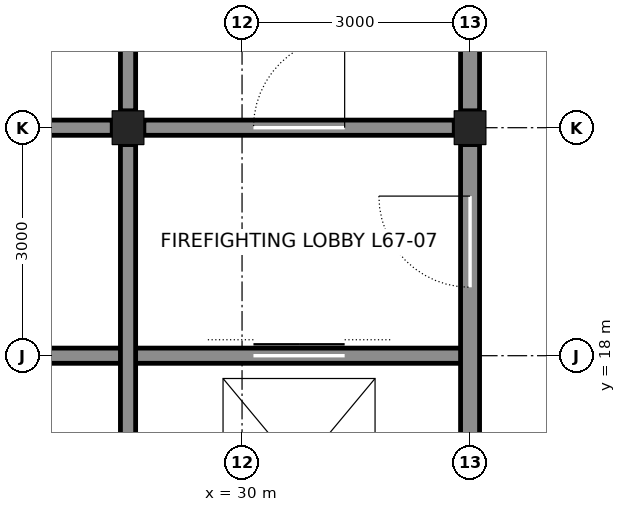
"""IFC4 building model, lengths in metres.
Left out: names, types, materials, properties, quantities, classifications, styles, units other than length and angle.
Written with IfcOpenShell. Run it as: python <this file> out.ifc"""

import sys

from ifc_helpers import new_model, si_unit, direction, frame, frame_2d, origin, origin_2d, place, context, subcontext, project, spatial, rectangle, i_section, extrude, element, fill, save


model = new_model("IFC4")
c1 = context("Model", 3, precision=1e-05, world=origin(), true_north=direction((0.0, 1.0)))
c2 = subcontext(c1, "Body", "Model", "MODEL_VIEW")
j1 = project(units=[si_unit("LENGTHUNIT", "METRE"), si_unit("PLANEANGLEUNIT", "RADIAN")], contexts=[c1])
p1 = place(None, origin())
s1 = spatial("IfcSite", under=j1, at=p1, CompositionType="ELEMENT")
p2 = place(p1, origin())
s2 = spatial("IfcBuilding", under=s1, at=p2, CompositionType="ELEMENT")
p3 = place(p2, frame((0.0, 0.0, 300.0)))
s3 = spatial("IfcBuildingStorey", under=s2, at=p3, CompositionType="ELEMENT", Elevation=300.0)
for number, where, z_axis, x_axis in (
    (1, (33.0, 21.0, 0.0), (0.0, 0.0, 1.0), (1.0, 0.0, 0.0)),
    (2, (28.5, 21.0, 0.0), (0.0, 0.0, 1.0), (1.0, 0.0, 0.0)),
):
    element("IfcColumn", number, at=place(p3, frame(where, z_axis=z_axis, x_axis=x_axis)), inside=s3, PredefinedType="COLUMN", context=c2, shape_type="SweptSolid", body=[
        extrude(i_section(OverallWidth=0.417, OverallDepth=0.445, WebThickness=0.039, FlangeThickness=0.063, at=origin_2d()), origin(), (0.0, 0.0, 1.0), 6.0),
    ])
p4 = place(p3, frame((25.5, 18.0, 0.0), z_axis=(0.0, 0.0, 1.0), x_axis=(1.0, 0.0, 0.0)))
e3 = element("IfcWall", 3, at=p4, inside=s3, PredefinedType="SOLIDWALL", context=c2, shape_type="SweptSolid", body=[
    extrude(rectangle(XDim=7.5, YDim=0.2, at=frame_2d((3.75, 0.0))), origin(), (0.0, 0.0, 1.0), 5.84),
])
p5 = place(p4, frame((4.65, 0.0, 0.0)))
e4 = element("IfcOpeningElement", 4, at=p5, cuts=e3, PredefinedType="OPENING", context=c2, shape_type="SweptSolid", body=[
    extrude(rectangle(XDim=1.2, YDim=2.1, at=frame_2d((0.6, 1.05))), frame((0.0, 0.11, 0.0), z_axis=(0.0, -1.0, 0.0), x_axis=(1.0, 0.0, 0.0)), (0.0, 0.0, 1.0), 0.22),
])
p6 = place(p3, frame((25.5, 21.0, 0.0), z_axis=(0.0, 0.0, 1.0), x_axis=(1.0, 0.0, 0.0)))
e5 = element("IfcWall", 5, at=p6, inside=s3, PredefinedType="SOLIDWALL", context=c2, shape_type="SweptSolid", body=[
    extrude(rectangle(XDim=2.792, YDim=0.2, at=frame_2d((1.396, 0.0))), origin(), (0.0, 0.0, 1.0), 4.89),
])
p7 = place(p3, frame((28.708, 21.0, 0.0), z_axis=(0.0, 0.0, 1.0), x_axis=(1.0, 0.0, 0.0)))
e6 = element("IfcWall", 6, at=p7, inside=s3, PredefinedType="SOLIDWALL", context=c2, shape_type="SweptSolid", body=[
    extrude(rectangle(XDim=4.083, YDim=0.2, at=frame_2d((2.042, 0.0))), origin(), (0.0, 0.0, 1.0), 4.89),
])
p8 = place(p7, frame((1.442, 0.0, 0.0)))
e7 = element("IfcOpeningElement", 7, at=p8, cuts=e6, PredefinedType="OPENING", context=c2, shape_type="SweptSolid", body=[
    extrude(rectangle(XDim=1.2, YDim=2.1, at=frame_2d((0.6, 1.05))), frame((0.0, 0.11, 0.0), z_axis=(0.0, -1.0, 0.0), x_axis=(1.0, 0.0, 0.0)), (0.0, 0.0, 1.0), 0.22),
])
p9 = place(p3, frame((28.5, 12.222, 0.0), z_axis=(0.0, 0.0, 1.0), x_axis=(0.0, 1.0, 0.0)))
e8 = element("IfcWall", 8, at=p9, inside=s3, PredefinedType="SOLIDWALL", context=c2, shape_type="SweptSolid", body=[
    extrude(rectangle(XDim=8.555, YDim=0.2, at=frame_2d((4.278, 0.0))), origin(), (0.0, 0.0, 1.0), 4.913),
])
p10 = place(p3, frame((28.5, 21.222, 0.0), z_axis=(0.0, 0.0, 1.0), x_axis=(0.0, 1.0, 0.0)))
e9 = element("IfcWall", 9, at=p10, inside=s3, PredefinedType="SOLIDWALL", context=c2, shape_type="SweptSolid", body=[
    extrude(rectangle(XDim=2.555, YDim=0.2, at=frame_2d((1.278, 0.0))), origin(), (0.0, 0.0, 1.0), 4.913),
])
p11 = place(p3, frame((33.0, 12.25, 0.0), z_axis=(0.0, 0.0, 1.0), x_axis=(0.0, 1.0, 0.0)))
e10 = element("IfcWall", 10, at=p11, inside=s3, PredefinedType="SOLIDWALL", context=c2, shape_type="SweptSolid", body=[
    extrude(rectangle(XDim=8.528, YDim=0.25, at=frame_2d((4.264, 0.0))), origin(), (0.0, 0.0, 1.0), 4.913),
])
p12 = place(p11, frame((6.65, 0.0, 0.0)))
e11 = element("IfcOpeningElement", 11, at=p12, cuts=e10, PredefinedType="OPENING", context=c2, shape_type="SweptSolid", body=[
    extrude(rectangle(XDim=1.2, YDim=2.1, at=frame_2d((0.6, 1.05))), frame((0.0, 0.135, 0.0), z_axis=(0.0, -1.0, 0.0), x_axis=(1.0, 0.0, 0.0)), (0.0, 0.0, 1.0), 0.27),
])
p13 = place(p11, frame((0.875, 0.0, 0.0)))
e12 = element("IfcOpeningElement", 12, at=p13, cuts=e10, PredefinedType="OPENING", context=c2, shape_type="SweptSolid", body=[
    extrude(rectangle(XDim=0.75, YDim=2.1, at=frame_2d((0.375, 1.05))), frame((0.0, 0.135, 0.0), z_axis=(0.0, -1.0, 0.0), x_axis=(1.0, 0.0, 0.0)), (0.0, 0.0, 1.0), 0.27),
])
p14 = place(p3, frame((33.0, 21.222, 0.0), z_axis=(0.0, 0.0, 1.0), x_axis=(0.0, 1.0, 0.0)))
e13 = element("IfcWall", 13, at=p14, inside=s3, PredefinedType="SOLIDWALL", context=c2, shape_type="SweptSolid", body=[
    extrude(rectangle(XDim=2.555, YDim=0.25, at=frame_2d((1.278, 0.0))), origin(), (0.0, 0.0, 1.0), 4.913),
])
p15 = place(p8, origin())
e14 = element("IfcDoor", 14, at=p15, inside=s3, OperationType="SINGLE_SWING_RIGHT", PredefinedType="DOOR", context=c2, shape_type="SweptSolid", body=[
    extrude(rectangle(XDim=1.2, YDim=2.1, at=frame_2d((0.6, 1.05))), frame((0.0, 0.025, 0.0), z_axis=(0.0, -1.0, 0.0), x_axis=(1.0, 0.0, 0.0)), (0.0, 0.0, 1.0), 0.05),
])
fill(e7, e14)
p16 = place(p12, origin())
e15 = element("IfcDoor", 15, at=p16, inside=s3, OperationType="SINGLE_SWING_RIGHT", PredefinedType="DOOR", context=c2, shape_type="SweptSolid", body=[
    extrude(rectangle(XDim=1.2, YDim=2.1, at=frame_2d((0.6, 1.05))), frame((0.0, 0.025, 0.0), z_axis=(0.0, -1.0, 0.0), x_axis=(1.0, 0.0, 0.0)), (0.0, 0.0, 1.0), 0.05),
])
fill(e11, e15)
p17 = place(p5, origin())
e16 = element("IfcDoor", 16, at=p17, inside=s3, OperationType="DOUBLE_DOOR_SLIDING", PredefinedType="DOOR", context=c2, shape_type="SweptSolid", body=[
    extrude(rectangle(XDim=1.2, YDim=2.1, at=frame_2d((0.6, 1.05))), frame((0.0, 0.025, 0.0), z_axis=(0.0, -1.0, 0.0), x_axis=(1.0, 0.0, 0.0)), (0.0, 0.0, 1.0), 0.05),
])
fill(e4, e16)
save(model, sys.argv[1])
